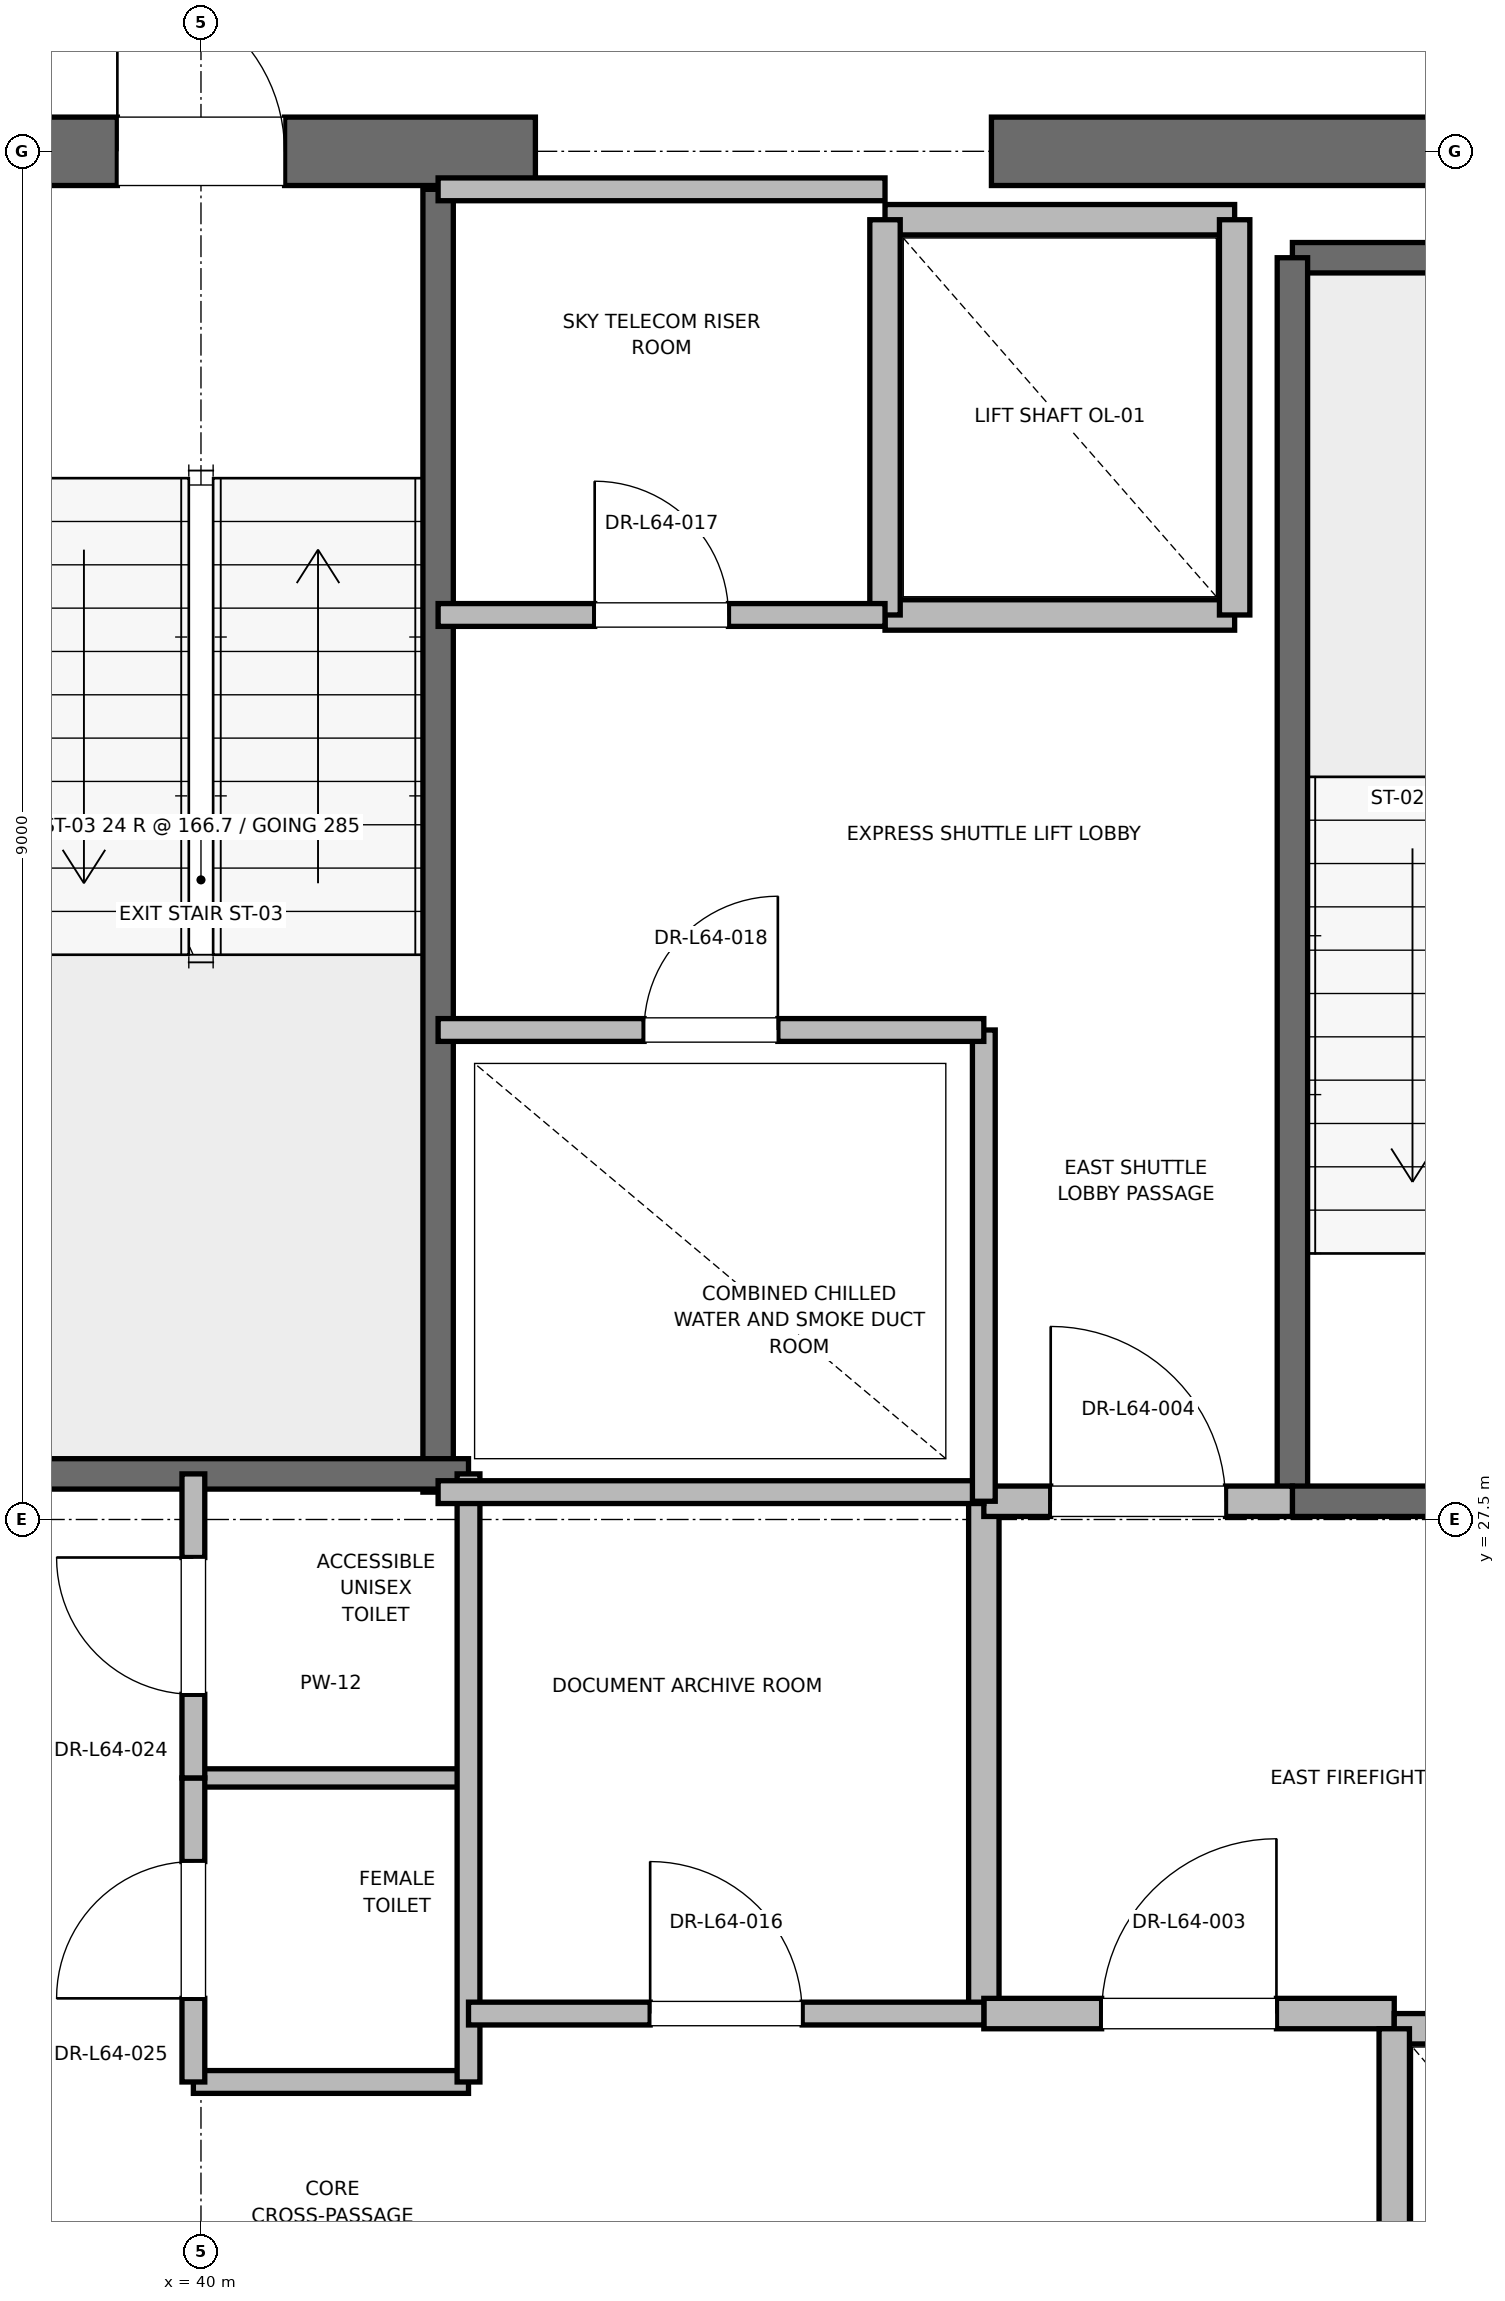
"""IFC4 building model, lengths in metres.
Left out: names, types, materials, properties, quantities, classifications, styles, units other than length and angle.
Written with IfcOpenShell. Run it as: python <this file> out.ifc"""

import sys

from ifc_helpers import new_model, si_unit, direction, frame, frame_2d, origin, place, context, subcontext, project, spatial, rectangle, extrude, element, fill, save


model = new_model("IFC4")
c1 = context("Model", 3, precision=1e-05, world=origin(), true_north=direction((0.0, 1.0)))
c2 = subcontext(c1, "Body", "Model", "MODEL_VIEW")
j1 = project(units=[si_unit("LENGTHUNIT", "METRE"), si_unit("PLANEANGLEUNIT", "RADIAN")], contexts=[c1])
p1 = place(None, origin())
s1 = spatial("IfcSite", under=j1, at=p1, CompositionType="ELEMENT")
p2 = place(p1, origin())
s2 = spatial("IfcBuilding", under=s1, at=p2, CompositionType="ELEMENT")
p3 = place(p2, frame((0.0, 0.0, 275.2)))
s3 = spatial("IfcBuildingStorey", under=s2, at=p3, CompositionType="ELEMENT", Elevation=275.2)
p4 = place(p3, frame((37.8, 36.5, 0.0), z_axis=(0.0, 0.0, 1.0), x_axis=(1.0, 0.0, 0.0)))
e1 = element("IfcWall", 1, at=p4, inside=s3, PredefinedType="SHEAR", context=c2, shape_type="SweptSolid", body=[
    extrude(rectangle(XDim=4.4, YDim=0.45, at=frame_2d((2.2, 0.0))), origin(), (0.0, 0.0, 1.0), 3.785),
])
p5 = place(p4, frame((1.65, 0.0, 0.0)))
e2 = element("IfcOpeningElement", 2, at=p5, cuts=e1, PredefinedType="OPENING", context=c2, shape_type="SweptSolid", body=[
    extrude(rectangle(XDim=1.1, YDim=2.15, at=frame_2d((0.55, 1.075))), frame((0.0, 0.225, 0.0), z_axis=(0.0, -1.0, 0.0), x_axis=(1.0, 0.0, 0.0)), (0.0, 0.0, 1.0), 0.45),
])
p6 = place(p3, frame((45.2, 36.5, 0.0), z_axis=(0.0, 0.0, 1.0), x_axis=(1.0, 0.0, 0.0)))
e3 = element("IfcWall", 3, at=p6, inside=s3, PredefinedType="SHEAR", context=c2, shape_type="SweptSolid", body=[
    extrude(rectangle(XDim=5.8, YDim=0.45, at=frame_2d((2.9, 0.0))), origin(), (0.0, 0.0, 1.0), 3.785),
])
p7 = place(p3, frame((47.18, 35.8, 0.0), z_axis=(0.0, 0.0, 1.0), x_axis=(1.0, 0.0, 0.0)))
e4 = element("IfcWall", 4, at=p7, inside=s3, PredefinedType="SOLIDWALL", context=c2, shape_type="SweptSolid", body=[
    extrude(rectangle(XDim=3.12, YDim=0.2, at=frame_2d((1.56, 0.0))), origin(), (0.0, 0.0, 1.0), 3.785),
])
p8 = place(p3, frame((47.18, 27.62, 0.0), z_axis=(0.0, 0.0, 1.0), x_axis=(0.0, 1.0, 0.0)))
e5 = element("IfcWall", 5, at=p8, inside=s3, PredefinedType="SOLIDWALL", context=c2, shape_type="SweptSolid", body=[
    extrude(rectangle(XDim=8.18, YDim=0.2, at=frame_2d((4.09, 0.0))), origin(), (0.0, 0.0, 1.0), 3.785),
])
p9 = place(p3, frame((47.18, 27.62, 0.0), z_axis=(0.0, 0.0, 1.0), x_axis=(1.0, 0.0, 0.0)))
e6 = element("IfcWall", 6, at=p9, inside=s3, PredefinedType="SOLIDWALL", context=c2, shape_type="SweptSolid", body=[
    extrude(rectangle(XDim=3.12, YDim=0.2, at=frame_2d((1.56, 0.0))), origin(), (0.0, 0.0, 1.0), 3.785),
])
p10 = place(p9, frame((1.01, 0.0, 0.0)))
e7 = element("IfcOpeningElement", 7, at=p10, cuts=e6, PredefinedType="OPENING", context=c2, shape_type="SweptSolid", body=[
    extrude(rectangle(XDim=1.1, YDim=2.15, at=frame_2d((0.55, 1.075))), frame((0.0, 0.1, 0.0), z_axis=(0.0, -1.0, 0.0), x_axis=(1.0, 0.0, 0.0)), (0.0, 0.0, 1.0), 0.2),
])
p11 = place(p3, frame((41.56, 27.68, 0.0), z_axis=(0.0, 0.0, 1.0), x_axis=(0.0, 1.0, 0.0)))
e8 = element("IfcWall", 8, at=p11, inside=s3, PredefinedType="SOLIDWALL", context=c2, shape_type="SweptSolid", body=[
    extrude(rectangle(XDim=8.57, YDim=0.2, at=frame_2d((4.285, 0.0))), origin(), (0.0, 0.0, 1.0), 3.785),
])
p12 = place(p3, frame((38.44, 27.8, 0.0), z_axis=(0.0, 0.0, 1.0), x_axis=(1.0, 0.0, 0.0)))
e9 = element("IfcWall", 9, at=p12, inside=s3, PredefinedType="SOLIDWALL", context=c2, shape_type="SweptSolid", body=[
    extrude(rectangle(XDim=3.32, YDim=0.2, at=frame_2d((1.66, 0.0))), origin(), (0.0, 0.0, 1.0), 3.785),
])
p13 = place(p3, frame((45.15, 24.25, 0.0), z_axis=(0.0, 0.0, 1.0), x_axis=(0.0, 1.0, 0.0)))
e10 = element("IfcWall", 10, at=p13, inside=s3, PredefinedType="PARTITIONING", context=c2, shape_type="SweptSolid", body=[
    extrude(rectangle(XDim=3.37, YDim=0.2, at=frame_2d((1.685, 0.0))), origin(), (0.0, 0.0, 1.0), 3.785),
])
p14 = place(p3, frame((45.15, 24.25, 0.0), z_axis=(0.0, 0.0, 1.0), x_axis=(1.0, 0.0, 0.0)))
e11 = element("IfcWall", 11, at=p14, inside=s3, PredefinedType="PARTITIONING", context=c2, shape_type="SweptSolid", body=[
    extrude(rectangle(XDim=2.7, YDim=0.2, at=frame_2d((1.35, 0.0))), origin(), (0.0, 0.0, 1.0), 3.785),
])
p15 = place(p14, frame((0.775, 0.0, 0.0)))
e12 = element("IfcOpeningElement", 12, at=p15, cuts=e11, PredefinedType="OPENING", context=c2, shape_type="SweptSolid", body=[
    extrude(rectangle(XDim=1.15, YDim=2.2, at=frame_2d((0.575, 1.1))), frame((0.0, 0.1, 0.0), z_axis=(0.0, -1.0, 0.0), x_axis=(1.0, 0.0, 0.0)), (0.0, 0.0, 1.0), 0.2),
])
p16 = place(p3, frame((45.15, 27.62, 0.0), z_axis=(0.0, 0.0, 1.0), x_axis=(1.0, 0.0, 0.0)))
e13 = element("IfcWall", 13, at=p16, inside=s3, PredefinedType="PARTITIONING", context=c2, shape_type="SweptSolid", body=[
    extrude(rectangle(XDim=2.03, YDim=0.2, at=frame_2d((1.015, 0.0))), origin(), (0.0, 0.0, 1.0), 3.785),
])
p17 = place(p16, frame((0.44, 0.0, 0.0)))
e14 = element("IfcOpeningElement", 14, at=p17, cuts=e13, PredefinedType="OPENING", context=c2, shape_type="SweptSolid", body=[
    extrude(rectangle(XDim=1.15, YDim=2.2, at=frame_2d((0.575, 1.1))), frame((0.0, 0.1, 0.0), z_axis=(0.0, -1.0, 0.0), x_axis=(1.0, 0.0, 0.0)), (0.0, 0.0, 1.0), 0.2),
])
p18 = place(p3, frame((50.45, 24.15, 0.0), z_axis=(0.0, 0.0, 1.0), x_axis=(-1.0, 0.0, 0.0)))
e15 = element("IfcWall", 15, at=p18, inside=s3, PredefinedType="SOLIDWALL", context=c2, shape_type="SweptSolid", body=[
    extrude(rectangle(XDim=2.6, YDim=0.2, at=frame_2d((1.3, 0.0))), origin(), (0.0, 0.0, 1.0), 2.865),
])
p19 = place(p18, frame((0.75, 0.0, 0.0)))
e16 = element("IfcOpeningElement", 16, at=p19, cuts=e15, PredefinedType="OPENING", context=c2, shape_type="SweptSolid", body=[
    extrude(rectangle(XDim=1.1, YDim=2.2, at=frame_2d((0.55, 1.1))), frame((0.0, 0.1, 0.0), z_axis=(0.0, -1.0, 0.0), x_axis=(1.0, 0.0, 0.0)), (0.0, 0.0, 1.0), 0.2),
])
p20 = place(p3, frame((47.85, 24.15, 0.0), z_axis=(0.0, 0.0, 1.0), x_axis=(0.0, -1.0, 0.0)))
e17 = element("IfcWall", 17, at=p20, inside=s3, PredefinedType="SOLIDWALL", context=c2, shape_type="SweptSolid", body=[
    extrude(rectangle(XDim=3.0, YDim=0.2, at=frame_2d((1.5, 0.0))), origin(), (0.0, 0.0, 1.0), 3.785),
])
p21 = place(p3, frame((44.5, 33.45, 0.0), z_axis=(0.0, 0.0, 1.0), x_axis=(1.0, 0.0, 0.0)))
e18 = element("IfcWall", 18, at=p21, inside=s3, PredefinedType="SOLIDWALL", context=c2, shape_type="SweptSolid", body=[
    extrude(rectangle(XDim=2.3, YDim=0.2, at=frame_2d((1.15, 0.0))), origin(), (0.0, 0.0, 1.0), 3.785),
])
p22 = place(p3, frame((46.8, 36.05, 0.0), z_axis=(0.0, 0.0, 1.0), x_axis=(-1.0, 0.0, 0.0)))
e19 = element("IfcWall", 19, at=p22, inside=s3, PredefinedType="SOLIDWALL", context=c2, shape_type="SweptSolid", body=[
    extrude(rectangle(XDim=2.3, YDim=0.2, at=frame_2d((1.15, 0.0))), origin(), (0.0, 0.0, 1.0), 2.865),
])
p23 = place(p3, frame((44.5, 36.05, 0.0), z_axis=(0.0, 0.0, 1.0), x_axis=(0.0, -1.0, 0.0)))
e20 = element("IfcWall", 20, at=p23, inside=s3, PredefinedType="SOLIDWALL", context=c2, shape_type="SweptSolid", body=[
    extrude(rectangle(XDim=2.6, YDim=0.2, at=frame_2d((1.3, 0.0))), origin(), (0.0, 0.0, 1.0), 2.865),
])
p24 = place(p3, frame((46.8, 33.45, 0.0), z_axis=(0.0, 0.0, 1.0), x_axis=(0.0, 1.0, 0.0)))
e21 = element("IfcWall", 21, at=p24, inside=s3, PredefinedType="SOLIDWALL", context=c2, shape_type="SweptSolid", body=[
    extrude(rectangle(XDim=2.6, YDim=0.2, at=frame_2d((1.3, 0.0))), origin(), (0.0, 0.0, 1.0), 3.785),
])
p25 = place(p3, frame((39.95, 23.8, 0.0), z_axis=(0.0, 0.0, 1.0), x_axis=(1.0, 0.0, 0.0)))
e22 = element("IfcWall", 22, at=p25, inside=s3, PredefinedType="PARTITIONING", context=c2, shape_type="SweptSolid", body=[
    extrude(rectangle(XDim=1.81, YDim=0.15, at=frame_2d((0.905, 0.0))), origin(), (0.0, 0.0, 1.0), 2.85),
])
p26 = place(p3, frame((39.95, 25.8, 0.0), z_axis=(0.0, 0.0, 1.0), x_axis=(1.0, 0.0, 0.0)))
e23 = element("IfcWall", 23, at=p26, inside=s3, PredefinedType="PARTITIONING", context=c2, shape_type="SweptSolid", body=[
    extrude(rectangle(XDim=1.81, YDim=0.12, at=frame_2d((0.905, 0.0))), origin(), (0.0, 0.0, 1.0), 2.85),
])
p27 = place(p3, frame((41.76, 23.8, 0.0), z_axis=(0.0, 0.0, 1.0), x_axis=(0.0, 1.0, 0.0)))
e24 = element("IfcWall", 24, at=p27, inside=s3, PredefinedType="PARTITIONING", context=c2, shape_type="SweptSolid", body=[
    extrude(rectangle(XDim=4.0, YDim=0.15, at=frame_2d((2.0, 0.0))), origin(), (0.0, 0.0, 1.0), 2.85),
])
p28 = place(p3, frame((39.95, 23.8, 0.0), z_axis=(0.0, 0.0, 1.0), x_axis=(0.0, 1.0, 0.0)))
e25 = element("IfcWall", 25, at=p28, inside=s3, PredefinedType="PARTITIONING", context=c2, shape_type="SweptSolid", body=[
    extrude(rectangle(XDim=2.0, YDim=0.15, at=frame_2d((1.0, 0.0))), origin(), (0.0, 0.0, 1.0), 2.85),
])
p29 = place(p28, frame((0.55, 0.0, 0.0)))
e26 = element("IfcOpeningElement", 26, at=p29, cuts=e25, PredefinedType="OPENING", context=c2, shape_type="SweptSolid", body=[
    extrude(rectangle(XDim=0.9, YDim=2.1, at=frame_2d((0.45, 1.05))), frame((0.0, 0.075, 0.0), z_axis=(0.0, -1.0, 0.0), x_axis=(1.0, 0.0, 0.0)), (0.0, 0.0, 1.0), 0.15),
])
p30 = place(p3, frame((39.95, 25.8, 0.0), z_axis=(0.0, 0.0, 1.0), x_axis=(0.0, 1.0, 0.0)))
e27 = element("IfcWall", 27, at=p30, inside=s3, PredefinedType="PARTITIONING", context=c2, shape_type="SweptSolid", body=[
    extrude(rectangle(XDim=2.0, YDim=0.15, at=frame_2d((1.0, 0.0))), origin(), (0.0, 0.0, 1.0), 2.85),
])
p31 = place(p30, frame((0.55, 0.0, 0.0)))
e28 = element("IfcOpeningElement", 28, at=p31, cuts=e27, PredefinedType="OPENING", context=c2, shape_type="SweptSolid", body=[
    extrude(rectangle(XDim=0.9, YDim=2.1, at=frame_2d((0.45, 1.05))), frame((0.0, 0.075, 0.0), z_axis=(0.0, -1.0, 0.0), x_axis=(1.0, 0.0, 0.0)), (0.0, 0.0, 1.0), 0.15),
])
p32 = place(p3, frame((41.56, 27.68, 0.0), z_axis=(0.0, 0.0, 1.0), x_axis=(1.0, 0.0, 0.0)))
e29 = element("IfcWall", 29, at=p32, inside=s3, PredefinedType="PARTITIONING", context=c2, shape_type="SweptSolid", body=[
    extrude(rectangle(XDim=3.59, YDim=0.15, at=frame_2d((1.795, 0.0))), origin(), (0.0, 0.0, 1.0), 2.85),
])
p33 = place(p3, frame((41.76, 24.25, 0.0), z_axis=(0.0, 0.0, 1.0), x_axis=(1.0, 0.0, 0.0)))
e30 = element("IfcWall", 30, at=p33, inside=s3, PredefinedType="PARTITIONING", context=c2, shape_type="SweptSolid", body=[
    extrude(rectangle(XDim=3.39, YDim=0.15, at=frame_2d((1.695, 0.0))), origin(), (0.0, 0.0, 1.0), 2.85),
])
p34 = place(p33, frame((1.195, 0.0, 0.0)))
e31 = element("IfcOpeningElement", 31, at=p34, cuts=e30, PredefinedType="OPENING", context=c2, shape_type="SweptSolid", body=[
    extrude(rectangle(XDim=1.0, YDim=2.15, at=frame_2d((0.5, 1.075))), frame((0.0, 0.075, 0.0), z_axis=(0.0, -1.0, 0.0), x_axis=(1.0, 0.0, 0.0)), (0.0, 0.0, 1.0), 0.15),
])
p35 = place(p3, frame((45.15, 27.62, 0.0), z_axis=(0.0, 0.0, 1.0), x_axis=(0.0, 1.0, 0.0)))
e32 = element("IfcWall", 32, at=p35, inside=s3, PredefinedType="PARTITIONING", context=c2, shape_type="SweptSolid", body=[
    extrude(rectangle(XDim=3.1, YDim=0.15, at=frame_2d((1.55, 0.0))), origin(), (0.0, 0.0, 1.0), 2.85),
])
p36 = place(p3, frame((41.56, 30.72, 0.0), z_axis=(0.0, 0.0, 1.0), x_axis=(1.0, 0.0, 0.0)))
e33 = element("IfcWall", 33, at=p36, inside=s3, PredefinedType="PARTITIONING", context=c2, shape_type="SweptSolid", body=[
    extrude(rectangle(XDim=3.59, YDim=0.15, at=frame_2d((1.795, 0.0))), origin(), (0.0, 0.0, 1.0), 2.85),
])
p37 = place(p36, frame((1.355, 0.0, 0.0)))
e34 = element("IfcOpeningElement", 34, at=p37, cuts=e33, PredefinedType="OPENING", context=c2, shape_type="SweptSolid", body=[
    extrude(rectangle(XDim=0.88, YDim=2.1, at=frame_2d((0.44, 1.05))), frame((0.0, 0.075, 0.0), z_axis=(0.0, -1.0, 0.0), x_axis=(1.0, 0.0, 0.0)), (0.0, 0.0, 1.0), 0.15),
])
p38 = place(p3, frame((41.56, 36.25, 0.0), z_axis=(0.0, 0.0, 1.0), x_axis=(1.0, 0.0, 0.0)))
e35 = element("IfcWall", 35, at=p38, inside=s3, PredefinedType="PARTITIONING", context=c2, shape_type="SweptSolid", body=[
    extrude(rectangle(XDim=2.94, YDim=0.15, at=frame_2d((1.47, 0.0))), origin(), (0.0, 0.0, 1.0), 2.85),
])
p39 = place(p3, frame((41.56, 33.45, 0.0), z_axis=(0.0, 0.0, 1.0), x_axis=(1.0, 0.0, 0.0)))
e36 = element("IfcWall", 36, at=p39, inside=s3, PredefinedType="PARTITIONING", context=c2, shape_type="SweptSolid", body=[
    extrude(rectangle(XDim=2.94, YDim=0.15, at=frame_2d((1.47, 0.0))), origin(), (0.0, 0.0, 1.0), 2.85),
])
p40 = place(p39, frame((1.03, 0.0, 0.0)))
e37 = element("IfcOpeningElement", 37, at=p40, cuts=e36, PredefinedType="OPENING", context=c2, shape_type="SweptSolid", body=[
    extrude(rectangle(XDim=0.88, YDim=2.1, at=frame_2d((0.44, 1.05))), frame((0.0, 0.075, 0.0), z_axis=(0.0, -1.0, 0.0), x_axis=(1.0, 0.0, 0.0)), (0.0, 0.0, 1.0), 0.15),
])
p41 = place(p5, origin())
e38 = element("IfcDoor", 38, at=p41, inside=s3, OperationType="SINGLE_SWING_LEFT", PredefinedType="DOOR", context=c2, shape_type="SweptSolid", body=[
    extrude(rectangle(XDim=1.1, YDim=2.15, at=frame_2d((0.55, 1.075))), frame((0.0, 0.025, 0.0), z_axis=(0.0, -1.0, 0.0), x_axis=(1.0, 0.0, 0.0)), (0.0, 0.0, 1.0), 0.05),
])
fill(e2, e38)
p42 = place(p15, origin())
e39 = element("IfcDoor", 39, at=p42, inside=s3, OperationType="SINGLE_SWING_RIGHT", PredefinedType="DOOR", context=c2, shape_type="SweptSolid", body=[
    extrude(rectangle(XDim=1.15, YDim=2.2, at=frame_2d((0.575, 1.1))), frame((0.0, 0.025, 0.0), z_axis=(0.0, -1.0, 0.0), x_axis=(1.0, 0.0, 0.0)), (0.0, 0.0, 1.0), 0.05),
])
fill(e12, e39)
p43 = place(p17, origin())
e40 = element("IfcDoor", 40, at=p43, inside=s3, OperationType="SINGLE_SWING_LEFT", PredefinedType="DOOR", context=c2, shape_type="SweptSolid", body=[
    extrude(rectangle(XDim=1.15, YDim=2.2, at=frame_2d((0.575, 1.1))), frame((0.0, 0.025, 0.0), z_axis=(0.0, -1.0, 0.0), x_axis=(1.0, 0.0, 0.0)), (0.0, 0.0, 1.0), 0.05),
])
fill(e14, e40)
p44 = place(p29, origin())
e41 = element("IfcDoor", 41, at=p44, inside=s3, OperationType="SINGLE_SWING_LEFT", PredefinedType="DOOR", context=c2, shape_type="SweptSolid", body=[
    extrude(rectangle(XDim=0.9, YDim=2.1, at=frame_2d((0.45, 1.05))), frame((0.0, 0.025, 0.0), z_axis=(0.0, -1.0, 0.0), x_axis=(1.0, 0.0, 0.0)), (0.0, 0.0, 1.0), 0.05),
])
fill(e26, e41)
p45 = place(p31, origin())
e42 = element("IfcDoor", 42, at=p45, inside=s3, OperationType="SINGLE_SWING_RIGHT", PredefinedType="DOOR", context=c2, shape_type="SweptSolid", body=[
    extrude(rectangle(XDim=0.9, YDim=2.1, at=frame_2d((0.45, 1.05))), frame((0.0, 0.025, 0.0), z_axis=(0.0, -1.0, 0.0), x_axis=(1.0, 0.0, 0.0)), (0.0, 0.0, 1.0), 0.05),
])
fill(e28, e42)
p46 = place(p34, origin())
e43 = element("IfcDoor", 43, at=p46, inside=s3, OperationType="SINGLE_SWING_LEFT", PredefinedType="DOOR", context=c2, shape_type="SweptSolid", body=[
    extrude(rectangle(XDim=1.0, YDim=2.15, at=frame_2d((0.5, 1.075))), frame((0.0, 0.025, 0.0), z_axis=(0.0, -1.0, 0.0), x_axis=(1.0, 0.0, 0.0)), (0.0, 0.0, 1.0), 0.05),
])
fill(e31, e43)
p47 = place(p37, origin())
e44 = element("IfcDoor", 44, at=p47, inside=s3, OperationType="SINGLE_SWING_RIGHT", PredefinedType="DOOR", context=c2, shape_type="SweptSolid", body=[
    extrude(rectangle(XDim=0.88, YDim=2.1, at=frame_2d((0.44, 1.05))), frame((0.0, 0.025, 0.0), z_axis=(0.0, -1.0, 0.0), x_axis=(1.0, 0.0, 0.0)), (0.0, 0.0, 1.0), 0.05),
])
fill(e34, e44)
p48 = place(p40, origin())
e45 = element("IfcDoor", 45, at=p48, inside=s3, OperationType="SINGLE_SWING_LEFT", PredefinedType="DOOR", context=c2, shape_type="SweptSolid", body=[
    extrude(rectangle(XDim=0.88, YDim=2.1, at=frame_2d((0.44, 1.05))), frame((0.0, 0.025, 0.0), z_axis=(0.0, -1.0, 0.0), x_axis=(1.0, 0.0, 0.0)), (0.0, 0.0, 1.0), 0.05),
])
fill(e37, e45)
save(model, sys.argv[1])
